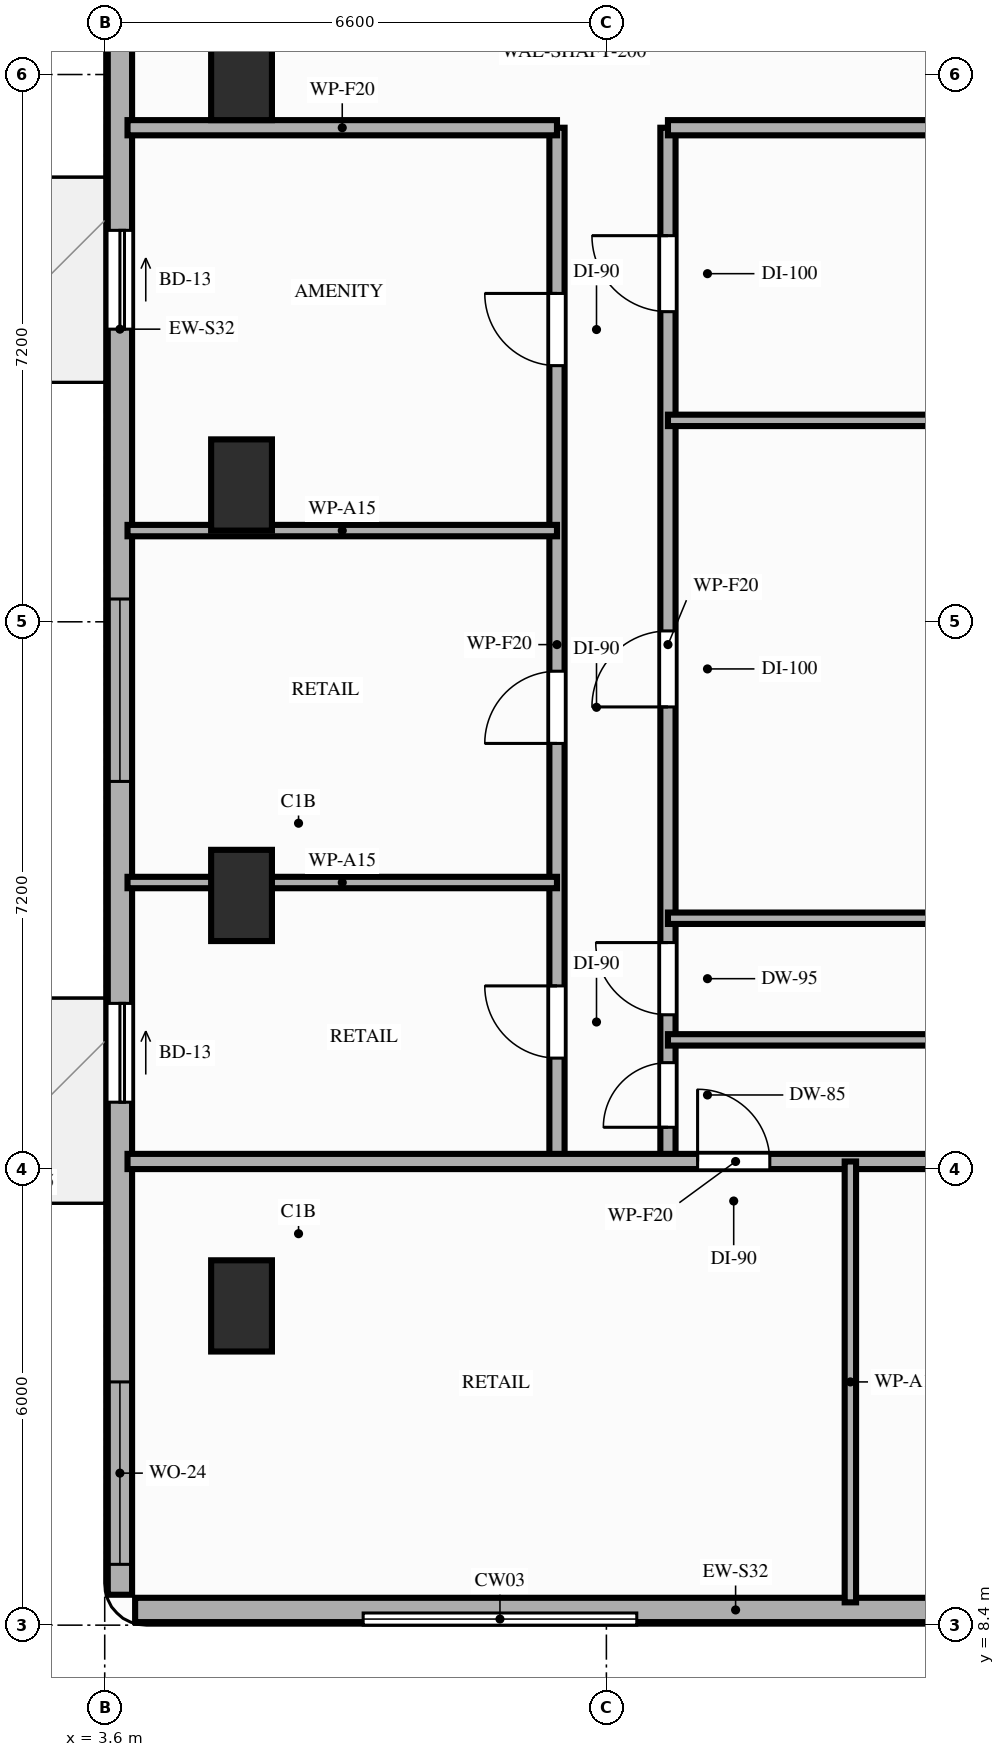
"""IFC4 building model, lengths in metres.
Left out: names, types, materials, properties, quantities, classifications, styles, units other than length and angle.
Written with IfcOpenShell. Run it as: python <this file> out.ifc"""

import sys

from ifc_helpers import new_model, si_unit, direction, frame, frame_2d, origin, origin_2d, place, context, subcontext, project, spatial, rectangle, extrude, element, fill, save


model = new_model("IFC4")
c1 = context("Model", 3, precision=1e-05, world=origin(), true_north=direction((0.0, 1.0)))
c2 = subcontext(c1, "Body", "Model", "MODEL_VIEW")
j1 = project(units=[si_unit("LENGTHUNIT", "METRE"), si_unit("PLANEANGLEUNIT", "RADIAN")], contexts=[c1])
p1 = place(None, origin())
s1 = spatial("IfcSite", under=j1, at=p1, CompositionType="ELEMENT")
p2 = place(p1, origin())
s2 = spatial("IfcBuilding", under=s1, at=p2, CompositionType="ELEMENT")
p3 = place(p2, frame((0.0, 0.0, 75.6)))
s3 = spatial("IfcBuildingStorey", under=s2, at=p3, CompositionType="ELEMENT", Elevation=75.6)
for number, where, z_axis, x_axis in (
    (1, (5.4, 12.6, 0.0), (0.0, 0.0, 1.0), (1.0, 0.0, 0.0)),
    (2, (5.4, 18.0, 0.0), (0.0, 0.0, 1.0), (1.0, 0.0, 0.0)),
    (3, (5.4, 23.4, 0.0), (0.0, 0.0, 1.0), (1.0, 0.0, 0.0)),
    (4, (5.4, 28.8, 0.0), (0.0, 0.0, 1.0), (1.0, 0.0, 0.0)),
):
    element("IfcColumn", number, at=place(p3, frame(where, z_axis=z_axis, x_axis=x_axis)), inside=s3, PredefinedType="COLUMN", context=c2, shape_type="SweptSolid", body=[
        extrude(rectangle(XDim=0.8, YDim=1.2, at=origin_2d()), origin(), (0.0, 0.0, 1.0), 3.8),
    ])
p4 = place(p3, frame((4.0, 8.6, 0.0), z_axis=(0.0, 0.0, 1.0), x_axis=(1.0, 0.0, 0.0)))
e5 = element("IfcWall", 5, at=p4, inside=s3, PredefinedType="STANDARD", context=c2, shape_type="SweptSolid", body=[
    extrude(rectangle(XDim=15.8, YDim=0.32, at=frame_2d((7.9, 0.0))), origin(), (0.0, 0.0, 1.0), 3.56),
])
p5 = place(p4, frame((11.2, 0.0, 0.85)))
e6 = element("IfcOpeningElement", 6, at=p5, cuts=e5, PredefinedType="OPENING", context=c2, shape_type="SweptSolid", body=[
    extrude(rectangle(XDim=2.4, YDim=1.8, at=frame_2d((1.2, 0.9))), frame((0.0, 0.17, 0.0), z_axis=(0.0, -1.0, 0.0), x_axis=(1.0, 0.0, 0.0)), (0.0, 0.0, 1.0), 0.34),
])
p6 = place(p3, frame((3.8, 42.1, 0.0), z_axis=(0.0, 0.0, 1.0), x_axis=(0.0, -1.0, 0.0)))
e7 = element("IfcWall", 7, at=p6, inside=s3, PredefinedType="STANDARD", context=c2, shape_type="SweptSolid", body=[
    extrude(rectangle(XDim=33.3, YDim=0.32, at=frame_2d((16.65, 0.0))), origin(), (0.0, 0.0, 1.0), 3.56),
])
p7 = place(p6, frame((25.52, 0.0, 0.0)))
e8 = element("IfcOpeningElement", 8, at=p7, cuts=e7, PredefinedType="OPENING", context=c2, shape_type="SweptSolid", body=[
    extrude(rectangle(XDim=1.3, YDim=2.08, at=frame_2d((0.65, 1.04))), frame((0.0, 0.17, 0.0), z_axis=(0.0, -1.0, 0.0), x_axis=(1.0, 0.0, 0.0)), (0.0, 0.0, 1.0), 0.34),
])
p8 = place(p6, frame((15.35, 0.0, 0.0)))
e9 = element("IfcOpeningElement", 9, at=p8, cuts=e7, PredefinedType="OPENING", context=c2, shape_type="SweptSolid", body=[
    extrude(rectangle(XDim=1.3, YDim=2.08, at=frame_2d((0.65, 1.04))), frame((0.0, 0.17, 0.0), z_axis=(0.0, -1.0, 0.0), x_axis=(1.0, 0.0, 0.0)), (0.0, 0.0, 1.0), 0.34),
])
p9 = place(p6, frame((30.5, 0.0, 0.85)))
e10 = element("IfcOpeningElement", 10, at=p9, cuts=e7, PredefinedType="OPENING", context=c2, shape_type="SweptSolid", body=[
    extrude(rectangle(XDim=2.4, YDim=1.8, at=frame_2d((1.2, 0.9))), frame((0.0, 0.17, 0.0), z_axis=(0.0, -1.0, 0.0), x_axis=(1.0, 0.0, 0.0)), (0.0, 0.0, 1.0), 0.34),
])
p10 = place(p6, frame((20.2, 0.0, 0.85)))
e11 = element("IfcOpeningElement", 11, at=p10, cuts=e7, PredefinedType="OPENING", context=c2, shape_type="SweptSolid", body=[
    extrude(rectangle(XDim=2.4, YDim=1.8, at=frame_2d((1.2, 0.9))), frame((0.0, 0.17, 0.0), z_axis=(0.0, -1.0, 0.0), x_axis=(1.0, 0.0, 0.0)), (0.0, 0.0, 1.0), 0.34),
])
p11 = place(p6, frame((9.6, 0.0, 0.85)))
e12 = element("IfcOpeningElement", 12, at=p11, cuts=e7, PredefinedType="OPENING", context=c2, shape_type="SweptSolid", body=[
    extrude(rectangle(XDim=2.4, YDim=1.8, at=frame_2d((1.2, 0.9))), frame((0.0, 0.17, 0.0), z_axis=(0.0, -1.0, 0.0), x_axis=(1.0, 0.0, 0.0)), (0.0, 0.0, 1.0), 0.34),
])
p12 = place(p6, frame((3.5, 0.0, 0.85)))
e13 = element("IfcOpeningElement", 13, at=p12, cuts=e7, PredefinedType="OPENING", context=c2, shape_type="SweptSolid", body=[
    extrude(rectangle(XDim=2.4, YDim=1.8, at=frame_2d((1.2, 0.9))), frame((0.0, 0.17, 0.0), z_axis=(0.0, -1.0, 0.0), x_axis=(1.0, 0.0, 0.0)), (0.0, 0.0, 1.0), 0.34),
])
p13 = place(p3, frame((9.55, 14.5, 0.0), z_axis=(0.0, 0.0, 1.0), x_axis=(0.0, 1.0, 0.0)))
e14 = element("IfcWall", 14, at=p13, inside=s3, PredefinedType="PARTITIONING", context=c2, shape_type="SweptSolid", body=[
    extrude(rectangle(XDim=13.6, YDim=0.2, at=frame_2d((6.8, 0.0))), origin(), (0.0, 0.0, 1.0), 2.95),
])
p14 = place(p13, frame((1.36, 0.0, 0.0)))
e15 = element("IfcOpeningElement", 15, at=p14, cuts=e14, PredefinedType="OPENING", context=c2, shape_type="SweptSolid", body=[
    extrude(rectangle(XDim=0.95, YDim=2.15, at=frame_2d((0.475, 1.075))), frame((0.0, 0.11, 0.0), z_axis=(0.0, -1.0, 0.0), x_axis=(1.0, 0.0, 0.0)), (0.0, 0.0, 1.0), 0.22),
])
p15 = place(p13, frame((5.5, 0.0, 0.0)))
e16 = element("IfcOpeningElement", 16, at=p15, cuts=e14, PredefinedType="OPENING", context=c2, shape_type="SweptSolid", body=[
    extrude(rectangle(XDim=0.95, YDim=2.15, at=frame_2d((0.475, 1.075))), frame((0.0, 0.11, 0.0), z_axis=(0.0, -1.0, 0.0), x_axis=(1.0, 0.0, 0.0)), (0.0, 0.0, 1.0), 0.22),
])
p16 = place(p13, frame((10.47, 0.0, 0.0)))
e17 = element("IfcOpeningElement", 17, at=p16, cuts=e14, PredefinedType="OPENING", context=c2, shape_type="SweptSolid", body=[
    extrude(rectangle(XDim=0.95, YDim=2.15, at=frame_2d((0.475, 1.075))), frame((0.0, 0.11, 0.0), z_axis=(0.0, -1.0, 0.0), x_axis=(1.0, 0.0, 0.0)), (0.0, 0.0, 1.0), 0.22),
])
p17 = place(p3, frame((11.01, 14.5, 0.0), z_axis=(0.0, 0.0, 1.0), x_axis=(0.0, 1.0, 0.0)))
e18 = element("IfcWall", 18, at=p17, inside=s3, PredefinedType="PARTITIONING", context=c2, shape_type="SweptSolid", body=[
    extrude(rectangle(XDim=13.6, YDim=0.2, at=frame_2d((6.8, 0.0))), origin(), (0.0, 0.0, 1.0), 2.95),
])
p18 = place(p17, frame((0.45, 0.0, 0.0)))
e19 = element("IfcOpeningElement", 19, at=p18, cuts=e18, PredefinedType="OPENING", context=c2, shape_type="SweptSolid", body=[
    extrude(rectangle(XDim=0.85, YDim=2.1, at=frame_2d((0.425, 1.05))), frame((0.0, 0.11, 0.0), z_axis=(0.0, -1.0, 0.0), x_axis=(1.0, 0.0, 0.0)), (0.0, 0.0, 1.0), 0.22),
])
p19 = place(p17, frame((1.93, 0.0, 0.0)))
e20 = element("IfcOpeningElement", 20, at=p19, cuts=e18, PredefinedType="OPENING", context=c2, shape_type="SweptSolid", body=[
    extrude(rectangle(XDim=0.95, YDim=2.1, at=frame_2d((0.475, 1.05))), frame((0.0, 0.11, 0.0), z_axis=(0.0, -1.0, 0.0), x_axis=(1.0, 0.0, 0.0)), (0.0, 0.0, 1.0), 0.22),
])
p20 = place(p17, frame((5.98, 0.0, 0.0)))
e21 = element("IfcOpeningElement", 21, at=p20, cuts=e18, PredefinedType="OPENING", context=c2, shape_type="SweptSolid", body=[
    extrude(rectangle(XDim=1.0, YDim=2.15, at=frame_2d((0.5, 1.075))), frame((0.0, 0.11, 0.0), z_axis=(0.0, -1.0, 0.0), x_axis=(1.0, 0.0, 0.0)), (0.0, 0.0, 1.0), 0.22),
])
p21 = place(p17, frame((11.18, 0.0, 0.0)))
e22 = element("IfcOpeningElement", 22, at=p21, cuts=e18, PredefinedType="OPENING", context=c2, shape_type="SweptSolid", body=[
    extrude(rectangle(XDim=1.0, YDim=2.15, at=frame_2d((0.5, 1.075))), frame((0.0, 0.11, 0.0), z_axis=(0.0, -1.0, 0.0), x_axis=(1.0, 0.0, 0.0)), (0.0, 0.0, 1.0), 0.22),
])
p22 = place(p3, frame((3.9, 14.5, 0.0), z_axis=(0.0, 0.0, 1.0), x_axis=(1.0, 0.0, 0.0)))
e23 = element("IfcWall", 23, at=p22, inside=s3, PredefinedType="PARTITIONING", context=c2, shape_type="SweptSolid", body=[
    extrude(rectangle(XDim=16.0, YDim=0.2, at=frame_2d((8.0, 0.0))), origin(), (0.0, 0.0, 1.0), 2.95),
])
p23 = place(p22, frame((7.5, 0.0, 0.0)))
e24 = element("IfcOpeningElement", 24, at=p23, cuts=e23, PredefinedType="OPENING", context=c2, shape_type="SweptSolid", body=[
    extrude(rectangle(XDim=0.95, YDim=2.15, at=frame_2d((0.475, 1.075))), frame((0.0, 0.11, 0.0), z_axis=(0.0, -1.0, 0.0), x_axis=(1.0, 0.0, 0.0)), (0.0, 0.0, 1.0), 0.22),
])
p24 = place(p22, frame((12.28, 0.0, 0.0)))
e25 = element("IfcOpeningElement", 25, at=p24, cuts=e23, PredefinedType="OPENING", context=c2, shape_type="SweptSolid", body=[
    extrude(rectangle(XDim=0.95, YDim=2.15, at=frame_2d((0.475, 1.075))), frame((0.0, 0.11, 0.0), z_axis=(0.0, -1.0, 0.0), x_axis=(1.0, 0.0, 0.0)), (0.0, 0.0, 1.0), 0.22),
])
p25 = place(p3, frame((3.9, 28.1, 0.0), z_axis=(0.0, 0.0, 1.0), x_axis=(1.0, 0.0, 0.0)))
e26 = element("IfcWall", 26, at=p25, inside=s3, PredefinedType="PARTITIONING", context=c2, shape_type="SweptSolid", body=[
    extrude(rectangle(XDim=5.65, YDim=0.2, at=frame_2d((2.825, 0.0))), origin(), (0.0, 0.0, 1.0), 2.95),
])
p26 = place(p3, frame((11.01, 28.1, 0.0), z_axis=(0.0, 0.0, 1.0), x_axis=(1.0, 0.0, 0.0)))
e27 = element("IfcWall", 27, at=p26, inside=s3, PredefinedType="PARTITIONING", context=c2, shape_type="SweptSolid", body=[
    extrude(rectangle(XDim=8.89, YDim=0.2, at=frame_2d((4.445, 0.0))), origin(), (0.0, 0.0, 1.0), 2.95),
])
for number, where, z_axis, x_axis in (
    (28, (3.9, 18.17, 0.0), (0.0, 0.0, 1.0), (1.0, 0.0, 0.0)),
    (29, (3.9, 22.8, 0.0), (0.0, 0.0, 1.0), (1.0, 0.0, 0.0)),
):
    element("IfcWall", number, at=place(p3, frame(where, z_axis=z_axis, x_axis=x_axis)), inside=s3, PredefinedType="PARTITIONING", context=c2, shape_type="SweptSolid", body=[
        extrude(rectangle(XDim=5.65, YDim=0.15, at=frame_2d((2.825, 0.0))), origin(), (0.0, 0.0, 1.0), 2.95),
    ])
p27 = place(p3, frame((13.41, 8.7, 0.0), z_axis=(0.0, 0.0, 1.0), x_axis=(0.0, 1.0, 0.0)))
e30 = element("IfcWall", 30, at=p27, inside=s3, PredefinedType="PARTITIONING", context=c2, shape_type="SweptSolid", body=[
    extrude(rectangle(XDim=5.8, YDim=0.15, at=frame_2d((2.9, 0.0))), origin(), (0.0, 0.0, 1.0), 2.95),
])
for number, where, z_axis, x_axis in (
    (31, (11.01, 16.1, 0.0), (0.0, 0.0, 1.0), (1.0, 0.0, 0.0)),
    (32, (11.01, 17.7, 0.0), (0.0, 0.0, 1.0), (1.0, 0.0, 0.0)),
    (33, (11.01, 24.25, 0.0), (0.0, 0.0, 1.0), (1.0, 0.0, 0.0)),
):
    element("IfcWall", number, at=place(p3, frame(where, z_axis=z_axis, x_axis=x_axis)), inside=s3, PredefinedType="PARTITIONING", context=c2, shape_type="SweptSolid", body=[
        extrude(rectangle(XDim=8.89, YDim=0.15, at=frame_2d((4.445, 0.0))), origin(), (0.0, 0.0, 1.0), 2.95),
    ])
p28 = place(p7, origin())
e34 = element("IfcDoor", 34, at=p28, inside=s3, OperationType="SLIDING_TO_LEFT", PredefinedType="DOOR", context=c2, shape_type="SweptSolid", body=[
    extrude(rectangle(XDim=1.3, YDim=2.08, at=frame_2d((0.65, 1.04))), frame((0.0, 0.025, 0.0), z_axis=(0.0, -1.0, 0.0), x_axis=(1.0, 0.0, 0.0)), (0.0, 0.0, 1.0), 0.05),
])
fill(e8, e34)
p29 = place(p8, origin())
e35 = element("IfcDoor", 35, at=p29, inside=s3, OperationType="SLIDING_TO_LEFT", PredefinedType="DOOR", context=c2, shape_type="SweptSolid", body=[
    extrude(rectangle(XDim=1.3, YDim=2.08, at=frame_2d((0.65, 1.04))), frame((0.0, 0.025, 0.0), z_axis=(0.0, -1.0, 0.0), x_axis=(1.0, 0.0, 0.0)), (0.0, 0.0, 1.0), 0.05),
])
fill(e9, e35)
p30 = place(p9, origin())
e36 = element("IfcWindow", 36, at=p30, inside=s3, PartitioningType="SINGLE_PANEL", PredefinedType="WINDOW", context=c2, shape_type="SweptSolid", body=[
    extrude(rectangle(XDim=2.4, YDim=1.8, at=frame_2d((1.2, 0.9))), frame((0.0, 0.03, 0.0), z_axis=(0.0, -1.0, 0.0), x_axis=(1.0, 0.0, 0.0)), (0.0, 0.0, 1.0), 0.06),
])
fill(e10, e36)
p31 = place(p10, origin())
e37 = element("IfcWindow", 37, at=p31, inside=s3, PartitioningType="SINGLE_PANEL", PredefinedType="WINDOW", context=c2, shape_type="SweptSolid", body=[
    extrude(rectangle(XDim=2.4, YDim=1.8, at=frame_2d((1.2, 0.9))), frame((0.0, 0.03, 0.0), z_axis=(0.0, -1.0, 0.0), x_axis=(1.0, 0.0, 0.0)), (0.0, 0.0, 1.0), 0.06),
])
fill(e11, e37)
p32 = place(p14, origin())
e38 = element("IfcDoor", 38, at=p32, inside=s3, OperationType="SINGLE_SWING_RIGHT", PredefinedType="DOOR", context=c2, shape_type="SweptSolid", body=[
    extrude(rectangle(XDim=0.95, YDim=2.15, at=frame_2d((0.475, 1.075))), frame((0.0, 0.025, 0.0), z_axis=(0.0, -1.0, 0.0), x_axis=(1.0, 0.0, 0.0)), (0.0, 0.0, 1.0), 0.05),
])
fill(e15, e38)
p33 = place(p15, origin())
e39 = element("IfcDoor", 39, at=p33, inside=s3, OperationType="SINGLE_SWING_LEFT", PredefinedType="DOOR", context=c2, shape_type="SweptSolid", body=[
    extrude(rectangle(XDim=0.95, YDim=2.15, at=frame_2d((0.475, 1.075))), frame((0.0, 0.025, 0.0), z_axis=(0.0, -1.0, 0.0), x_axis=(1.0, 0.0, 0.0)), (0.0, 0.0, 1.0), 0.05),
])
fill(e16, e39)
p34 = place(p16, origin())
e40 = element("IfcDoor", 40, at=p34, inside=s3, OperationType="SINGLE_SWING_RIGHT", PredefinedType="DOOR", context=c2, shape_type="SweptSolid", body=[
    extrude(rectangle(XDim=0.95, YDim=2.15, at=frame_2d((0.475, 1.075))), frame((0.0, 0.025, 0.0), z_axis=(0.0, -1.0, 0.0), x_axis=(1.0, 0.0, 0.0)), (0.0, 0.0, 1.0), 0.05),
])
fill(e17, e40)
p35 = place(p23, origin())
e41 = element("IfcDoor", 41, at=p35, inside=s3, OperationType="SINGLE_SWING_LEFT", PredefinedType="DOOR", context=c2, shape_type="SweptSolid", body=[
    extrude(rectangle(XDim=0.95, YDim=2.15, at=frame_2d((0.475, 1.075))), frame((0.0, 0.025, 0.0), z_axis=(0.0, -1.0, 0.0), x_axis=(1.0, 0.0, 0.0)), (0.0, 0.0, 1.0), 0.05),
])
fill(e24, e41)
p36 = place(p18, origin())
e42 = element("IfcDoor", 42, at=p36, inside=s3, OperationType="SINGLE_SWING_LEFT", PredefinedType="DOOR", context=c2, shape_type="SweptSolid", body=[
    extrude(rectangle(XDim=0.85, YDim=2.1, at=frame_2d((0.425, 1.05))), frame((0.0, 0.025, 0.0), z_axis=(0.0, -1.0, 0.0), x_axis=(1.0, 0.0, 0.0)), (0.0, 0.0, 1.0), 0.05),
])
fill(e19, e42)
p37 = place(p19, origin())
e43 = element("IfcDoor", 43, at=p37, inside=s3, OperationType="SINGLE_SWING_RIGHT", PredefinedType="DOOR", context=c2, shape_type="SweptSolid", body=[
    extrude(rectangle(XDim=0.95, YDim=2.1, at=frame_2d((0.475, 1.05))), frame((0.0, 0.025, 0.0), z_axis=(0.0, -1.0, 0.0), x_axis=(1.0, 0.0, 0.0)), (0.0, 0.0, 1.0), 0.05),
])
fill(e20, e43)
p38 = place(p20, origin())
e44 = element("IfcDoor", 44, at=p38, inside=s3, OperationType="SINGLE_SWING_LEFT", PredefinedType="DOOR", context=c2, shape_type="SweptSolid", body=[
    extrude(rectangle(XDim=1.0, YDim=2.15, at=frame_2d((0.5, 1.075))), frame((0.0, 0.025, 0.0), z_axis=(0.0, -1.0, 0.0), x_axis=(1.0, 0.0, 0.0)), (0.0, 0.0, 1.0), 0.05),
])
fill(e21, e44)
p39 = place(p21, origin())
e45 = element("IfcDoor", 45, at=p39, inside=s3, OperationType="SINGLE_SWING_RIGHT", PredefinedType="DOOR", context=c2, shape_type="SweptSolid", body=[
    extrude(rectangle(XDim=1.0, YDim=2.15, at=frame_2d((0.5, 1.075))), frame((0.0, 0.025, 0.0), z_axis=(0.0, -1.0, 0.0), x_axis=(1.0, 0.0, 0.0)), (0.0, 0.0, 1.0), 0.05),
])
fill(e22, e45)
save(model, sys.argv[1])
